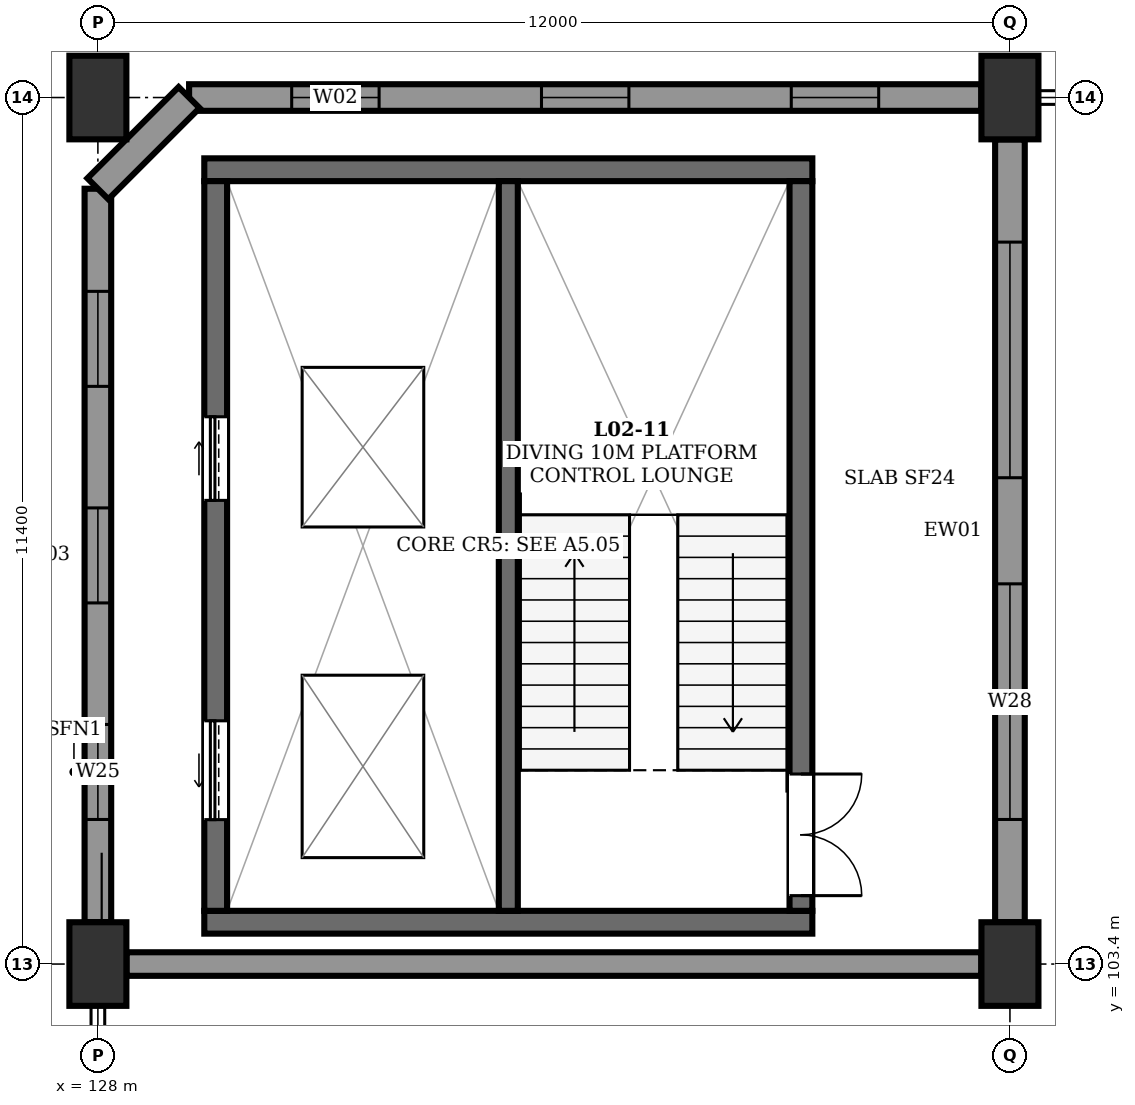
"""IFC4 building model, lengths in metres.
Left out: names, types, materials, properties, quantities, classifications, styles, units other than length and angle.
Written with IfcOpenShell. Run it as: python <this file> out.ifc"""

import sys

from ifc_helpers import new_model, si_unit, direction, frame, frame_2d, origin, origin_2d, place, context, subcontext, project, spatial, rectangle, extrude, element, fill, save


model = new_model("IFC4")
c1 = context("Model", 3, precision=1e-05, world=origin(), true_north=direction((0.0, 1.0)))
c2 = subcontext(c1, "Body", "Model", "MODEL_VIEW")
j1 = project(units=[si_unit("LENGTHUNIT", "METRE"), si_unit("PLANEANGLEUNIT", "RADIAN")], contexts=[c1])
p1 = place(None, origin())
s1 = spatial("IfcSite", under=j1, at=p1, CompositionType="ELEMENT")
p2 = place(p1, origin())
s2 = spatial("IfcBuilding", under=s1, at=p2, CompositionType="ELEMENT")
p3 = place(p2, frame((0.0, 0.0, 10.2)))
s3 = spatial("IfcBuildingStorey", under=s2, at=p3, CompositionType="ELEMENT", Elevation=10.2)
for number, where, z_axis, x_axis in (
    (1, (128.0, 103.4, 0.0), (0.0, 0.0, 1.0), (1.0, 0.0, 0.0)),
    (2, (128.0, 114.8, 0.0), (0.0, 0.0, 1.0), (1.0, 0.0, 0.0)),
    (3, (140.0, 103.4, 0.0), (0.0, 0.0, 1.0), (1.0, 0.0, 0.0)),
    (4, (140.0, 114.8, 0.0), (0.0, 0.0, 1.0), (1.0, 0.0, 0.0)),
):
    element("IfcColumn", number, at=place(p3, frame(where, z_axis=z_axis, x_axis=x_axis)), inside=s3, PredefinedType="COLUMN", context=c2, shape_type="SweptSolid", body=[
        extrude(rectangle(XDim=0.75, YDim=1.1, at=origin_2d()), origin(), (0.0, 0.0, 1.0), 4.5),
    ])
p4 = place(p3, frame((128.0, 103.952, 0.0), z_axis=(0.0, 0.0, 1.0), x_axis=(0.0, 1.0, 0.0)))
e5 = element("IfcWall", 5, at=p4, inside=s3, PredefinedType="STANDARD", context=c2, shape_type="SweptSolid", body=[
    extrude(rectangle(XDim=9.648, YDim=0.35, at=frame_2d((4.824, 0.0))), origin(), (0.0, 0.0, 1.0), 3.712),
])
p5 = place(p4, frame((1.35, 0.0, 0.75)))
e6 = element("IfcOpeningElement", 6, at=p5, cuts=e5, PredefinedType="OPENING", context=c2, shape_type="SweptSolid", body=[
    extrude(rectangle(XDim=1.25, YDim=2.5, at=frame_2d((0.625, 1.25))), frame((0.0, 0.187, 0.0), z_axis=(0.0, -1.0, 0.0), x_axis=(1.0, 0.0, 0.0)), (0.0, 0.0, 1.0), 0.374),
])
p6 = place(p4, frame((4.199, 0.0, 0.75)))
e7 = element("IfcOpeningElement", 7, at=p6, cuts=e5, PredefinedType="OPENING", context=c2, shape_type="SweptSolid", body=[
    extrude(rectangle(XDim=1.25, YDim=2.5, at=frame_2d((0.625, 1.25))), frame((0.0, 0.187, 0.0), z_axis=(0.0, -1.0, 0.0), x_axis=(1.0, 0.0, 0.0)), (0.0, 0.0, 1.0), 0.374),
])
p7 = place(p4, frame((7.048, 0.0, 0.75)))
e8 = element("IfcOpeningElement", 8, at=p7, cuts=e5, PredefinedType="OPENING", context=c2, shape_type="SweptSolid", body=[
    extrude(rectangle(XDim=1.25, YDim=2.5, at=frame_2d((0.625, 1.25))), frame((0.0, 0.187, 0.0), z_axis=(0.0, -1.0, 0.0), x_axis=(1.0, 0.0, 0.0)), (0.0, 0.0, 1.0), 0.374),
])
p8 = place(p3, frame((128.377, 103.4, 0.0), z_axis=(0.0, 0.0, 1.0), x_axis=(1.0, 0.0, 0.0)))
e9 = element("IfcWall", 9, at=p8, inside=s3, PredefinedType="STANDARD", context=c2, shape_type="SweptSolid", body=[
    extrude(rectangle(XDim=11.246, YDim=0.31, at=frame_2d((5.623, 0.0))), origin(), (0.0, 0.0, 1.0), 3.345),
])
p9 = place(p3, frame((140.0, 103.952, 0.0), z_axis=(0.0, 0.0, 1.0), x_axis=(0.0, 1.0, 0.0)))
e10 = element("IfcWall", 10, at=p9, inside=s3, PredefinedType="STANDARD", context=c2, shape_type="SweptSolid", body=[
    extrude(rectangle(XDim=10.296, YDim=0.39, at=frame_2d((5.148, 0.0))), origin(), (0.0, 0.0, 1.0), 3.545),
])
p10 = place(p9, frame((1.35, 0.0, 0.75)))
e11 = element("IfcOpeningElement", 11, at=p10, cuts=e10, PredefinedType="OPENING", context=c2, shape_type="SweptSolid", body=[
    extrude(rectangle(XDim=3.1, YDim=2.5, at=frame_2d((1.55, 1.25))), frame((0.0, 0.207, 0.0), z_axis=(0.0, -1.0, 0.0), x_axis=(1.0, 0.0, 0.0)), (0.0, 0.0, 1.0), 0.414),
])
p11 = place(p9, frame((5.846, 0.0, 0.75)))
e12 = element("IfcOpeningElement", 12, at=p11, cuts=e10, PredefinedType="OPENING", context=c2, shape_type="SweptSolid", body=[
    extrude(rectangle(XDim=3.1, YDim=2.5, at=frame_2d((1.55, 1.25))), frame((0.0, 0.207, 0.0), z_axis=(0.0, -1.0, 0.0), x_axis=(1.0, 0.0, 0.0)), (0.0, 0.0, 1.0), 0.414),
])
p12 = place(p3, frame((129.2, 114.8, 0.0), z_axis=(0.0, 0.0, 1.0), x_axis=(1.0, 0.0, 0.0)))
e13 = element("IfcWall", 13, at=p12, inside=s3, PredefinedType="STANDARD", context=c2, shape_type="SweptSolid", body=[
    extrude(rectangle(XDim=10.423, YDim=0.35, at=frame_2d((5.211, 0.0))), origin(), (0.0, 0.0, 1.0), 3.712),
])
p13 = place(p12, frame((1.35, 0.0, 0.75)))
e14 = element("IfcOpeningElement", 14, at=p13, cuts=e13, PredefinedType="OPENING", context=c2, shape_type="SweptSolid", body=[
    extrude(rectangle(XDim=1.15, YDim=1.75, at=frame_2d((0.575, 0.875))), frame((0.0, 0.187, 0.0), z_axis=(0.0, -1.0, 0.0), x_axis=(1.0, 0.0, 0.0)), (0.0, 0.0, 1.0), 0.374),
])
p14 = place(p12, frame((4.636, 0.0, 0.75)))
e15 = element("IfcOpeningElement", 15, at=p14, cuts=e13, PredefinedType="OPENING", context=c2, shape_type="SweptSolid", body=[
    extrude(rectangle(XDim=1.15, YDim=1.75, at=frame_2d((0.575, 0.875))), frame((0.0, 0.187, 0.0), z_axis=(0.0, -1.0, 0.0), x_axis=(1.0, 0.0, 0.0)), (0.0, 0.0, 1.0), 0.374),
])
p15 = place(p12, frame((7.923, 0.0, 0.75)))
e16 = element("IfcOpeningElement", 16, at=p15, cuts=e13, PredefinedType="OPENING", context=c2, shape_type="SweptSolid", body=[
    extrude(rectangle(XDim=1.15, YDim=1.75, at=frame_2d((0.575, 0.875))), frame((0.0, 0.187, 0.0), z_axis=(0.0, -1.0, 0.0), x_axis=(1.0, 0.0, 0.0)), (0.0, 0.0, 1.0), 0.374),
])
p16 = place(p3, frame((128.0, 113.6, 0.0), z_axis=(0.0, 0.0, 1.0), x_axis=(0.707106781187, 0.707106781187, 0.0)))
e17 = element("IfcWall", 17, at=p16, inside=s3, PredefinedType="STANDARD", context=c2, shape_type="SweptSolid", body=[
    extrude(rectangle(XDim=1.697, YDim=0.39, at=frame_2d((0.849, 0.0))), origin(), (0.0, 0.0, 1.0), 3.712),
])
for number, where, z_axis, x_axis in (
    (18, (129.4, 103.95, 0.0), (0.0, 0.0, 1.0), (1.0, 0.0, 0.0)),
    (19, (129.4, 113.85, 0.0), (0.0, 0.0, 1.0), (1.0, 0.0, 0.0)),
):
    element("IfcWall", number, at=place(p3, frame(where, z_axis=z_axis, x_axis=x_axis)), inside=s3, PredefinedType="SHEAR", context=c2, shape_type="SweptSolid", body=[
        extrude(rectangle(XDim=8.0, YDim=0.3, at=frame_2d((4.0, 0.0))), origin(), (0.0, 0.0, 1.0), 4.26),
    ])
p17 = place(p3, frame((129.55, 104.1, 0.0), z_axis=(0.0, 0.0, 1.0), x_axis=(0.0, 1.0, 0.0)))
e20 = element("IfcWall", 20, at=p17, inside=s3, PredefinedType="SHEAR", context=c2, shape_type="SweptSolid", body=[
    extrude(rectangle(XDim=9.6, YDim=0.3, at=frame_2d((4.8, 0.0))), origin(), (0.0, 0.0, 1.0), 4.26),
])
p18 = place(p17, frame((1.2, 0.0, 0.0)))
e21 = element("IfcOpeningElement", 21, at=p18, cuts=e20, PredefinedType="OPENING", context=c2, shape_type="SweptSolid", body=[
    extrude(rectangle(XDim=1.3, YDim=2.2, at=frame_2d((0.65, 1.1))), frame((0.0, 0.162, 0.0), z_axis=(0.0, -1.0, 0.0), x_axis=(1.0, 0.0, 0.0)), (0.0, 0.0, 1.0), 0.324),
])
p19 = place(p17, frame((5.4, 0.0, 0.0)))
e22 = element("IfcOpeningElement", 22, at=p19, cuts=e20, PredefinedType="OPENING", context=c2, shape_type="SweptSolid", body=[
    extrude(rectangle(XDim=1.1, YDim=2.2, at=frame_2d((0.55, 1.1))), frame((0.0, 0.162, 0.0), z_axis=(0.0, -1.0, 0.0), x_axis=(1.0, 0.0, 0.0)), (0.0, 0.0, 1.0), 0.324),
])
p20 = place(p3, frame((137.25, 104.1, 0.0), z_axis=(0.0, 0.0, 1.0), x_axis=(0.0, 1.0, 0.0)))
e23 = element("IfcWall", 23, at=p20, inside=s3, PredefinedType="SHEAR", context=c2, shape_type="SweptSolid", body=[
    extrude(rectangle(XDim=9.6, YDim=0.3, at=frame_2d((4.8, 0.0))), origin(), (0.0, 0.0, 1.0), 4.26),
])
p21 = place(p20, frame((0.2, 0.0, 0.0)))
e24 = element("IfcOpeningElement", 24, at=p21, cuts=e23, PredefinedType="OPENING", context=c2, shape_type="SweptSolid", body=[
    extrude(rectangle(XDim=1.6, YDim=2.2, at=frame_2d((0.8, 1.1))), frame((0.0, 0.162, 0.0), z_axis=(0.0, -1.0, 0.0), x_axis=(1.0, 0.0, 0.0)), (0.0, 0.0, 1.0), 0.324),
])
p22 = place(p3, frame((133.4, 104.1, 0.0), z_axis=(0.0, 0.0, 1.0), x_axis=(0.0, 1.0, 0.0)))
e25 = element("IfcWall", 25, at=p22, inside=s3, PredefinedType="SHEAR", context=c2, shape_type="SweptSolid", body=[
    extrude(rectangle(XDim=9.6, YDim=0.25, at=frame_2d((4.8, 0.0))), origin(), (0.0, 0.0, 1.0), 4.26),
])
p23 = place(p5, origin())
e26 = element("IfcWindow", 26, at=p23, inside=s3, PartitioningType="SINGLE_PANEL", PredefinedType="WINDOW", context=c2, shape_type="SweptSolid", body=[
    extrude(rectangle(XDim=1.25, YDim=2.5, at=frame_2d((0.625, 1.25))), frame((0.0, 0.08, 0.0), z_axis=(0.0, -1.0, 0.0), x_axis=(1.0, 0.0, 0.0)), (0.0, 0.0, 1.0), 0.06),
])
fill(e6, e26)
p24 = place(p6, origin())
e27 = element("IfcWindow", 27, at=p24, inside=s3, PartitioningType="SINGLE_PANEL", PredefinedType="WINDOW", context=c2, shape_type="SweptSolid", body=[
    extrude(rectangle(XDim=1.25, YDim=2.5, at=frame_2d((0.625, 1.25))), frame((0.0, 0.08, 0.0), z_axis=(0.0, -1.0, 0.0), x_axis=(1.0, 0.0, 0.0)), (0.0, 0.0, 1.0), 0.06),
])
fill(e7, e27)
p25 = place(p7, origin())
e28 = element("IfcWindow", 28, at=p25, inside=s3, PartitioningType="SINGLE_PANEL", PredefinedType="WINDOW", context=c2, shape_type="SweptSolid", body=[
    extrude(rectangle(XDim=1.25, YDim=2.5, at=frame_2d((0.625, 1.25))), frame((0.0, 0.08, 0.0), z_axis=(0.0, -1.0, 0.0), x_axis=(1.0, 0.0, 0.0)), (0.0, 0.0, 1.0), 0.06),
])
fill(e8, e28)
p26 = place(p10, origin())
e29 = element("IfcWindow", 29, at=p26, inside=s3, PartitioningType="TRIPLE_PANEL_VERTICAL", PredefinedType="WINDOW", context=c2, shape_type="SweptSolid", body=[
    extrude(rectangle(XDim=3.1, YDim=2.5, at=frame_2d((1.55, 1.25))), frame((0.0, 0.08, 0.0), z_axis=(0.0, -1.0, 0.0), x_axis=(1.0, 0.0, 0.0)), (0.0, 0.0, 1.0), 0.06),
])
fill(e11, e29)
p27 = place(p11, origin())
e30 = element("IfcWindow", 30, at=p27, inside=s3, PartitioningType="TRIPLE_PANEL_VERTICAL", PredefinedType="WINDOW", context=c2, shape_type="SweptSolid", body=[
    extrude(rectangle(XDim=3.1, YDim=2.5, at=frame_2d((1.55, 1.25))), frame((0.0, 0.08, 0.0), z_axis=(0.0, -1.0, 0.0), x_axis=(1.0, 0.0, 0.0)), (0.0, 0.0, 1.0), 0.06),
])
fill(e12, e30)
p28 = place(p13, origin())
e31 = element("IfcWindow", 31, at=p28, inside=s3, PartitioningType="SINGLE_PANEL", PredefinedType="WINDOW", context=c2, shape_type="SweptSolid", body=[
    extrude(rectangle(XDim=1.15, YDim=1.75, at=frame_2d((0.575, 0.875))), frame((0.0, 0.08, 0.0), z_axis=(0.0, -1.0, 0.0), x_axis=(1.0, 0.0, 0.0)), (0.0, 0.0, 1.0), 0.06),
])
fill(e14, e31)
p29 = place(p14, origin())
e32 = element("IfcWindow", 32, at=p29, inside=s3, PartitioningType="SINGLE_PANEL", PredefinedType="WINDOW", context=c2, shape_type="SweptSolid", body=[
    extrude(rectangle(XDim=1.15, YDim=1.75, at=frame_2d((0.575, 0.875))), frame((0.0, 0.08, 0.0), z_axis=(0.0, -1.0, 0.0), x_axis=(1.0, 0.0, 0.0)), (0.0, 0.0, 1.0), 0.06),
])
fill(e15, e32)
p30 = place(p15, origin())
e33 = element("IfcWindow", 33, at=p30, inside=s3, PartitioningType="SINGLE_PANEL", PredefinedType="WINDOW", context=c2, shape_type="SweptSolid", body=[
    extrude(rectangle(XDim=1.15, YDim=1.75, at=frame_2d((0.575, 0.875))), frame((0.0, 0.08, 0.0), z_axis=(0.0, -1.0, 0.0), x_axis=(1.0, 0.0, 0.0)), (0.0, 0.0, 1.0), 0.06),
])
fill(e16, e33)
p31 = place(p21, frame((1.6, 0.0, 0.0), z_axis=(0.0, 0.0, 1.0), x_axis=(-1.0, 0.0, 0.0)))
e34 = element("IfcDoor", 34, at=p31, inside=s3, OperationType="DOUBLE_DOOR_SINGLE_SWING", PredefinedType="DOOR", context=c2, shape_type="SweptSolid", body=[
    extrude(rectangle(XDim=1.6, YDim=2.2, at=frame_2d((0.8, 1.1))), frame((0.0, 0.025, 0.0), z_axis=(0.0, -1.0, 0.0), x_axis=(1.0, 0.0, 0.0)), (0.0, 0.0, 1.0), 0.05),
])
fill(e24, e34)
p32 = place(p18, origin())
e35 = element("IfcDoor", 35, at=p32, inside=s3, OperationType="SLIDING_TO_LEFT", PredefinedType="DOOR", context=c2, shape_type="SweptSolid", body=[
    extrude(rectangle(XDim=1.3, YDim=2.2, at=frame_2d((0.65, 1.1))), frame((0.0, 0.025, 0.0), z_axis=(0.0, -1.0, 0.0), x_axis=(1.0, 0.0, 0.0)), (0.0, 0.0, 1.0), 0.05),
])
fill(e21, e35)
p33 = place(p19, origin())
e36 = element("IfcDoor", 36, at=p33, inside=s3, OperationType="SLIDING_TO_RIGHT", PredefinedType="DOOR", context=c2, shape_type="SweptSolid", body=[
    extrude(rectangle(XDim=1.1, YDim=2.2, at=frame_2d((0.55, 1.1))), frame((0.0, 0.025, 0.0), z_axis=(0.0, -1.0, 0.0), x_axis=(1.0, 0.0, 0.0)), (0.0, 0.0, 1.0), 0.05),
])
fill(e22, e36)
save(model, sys.argv[1])
